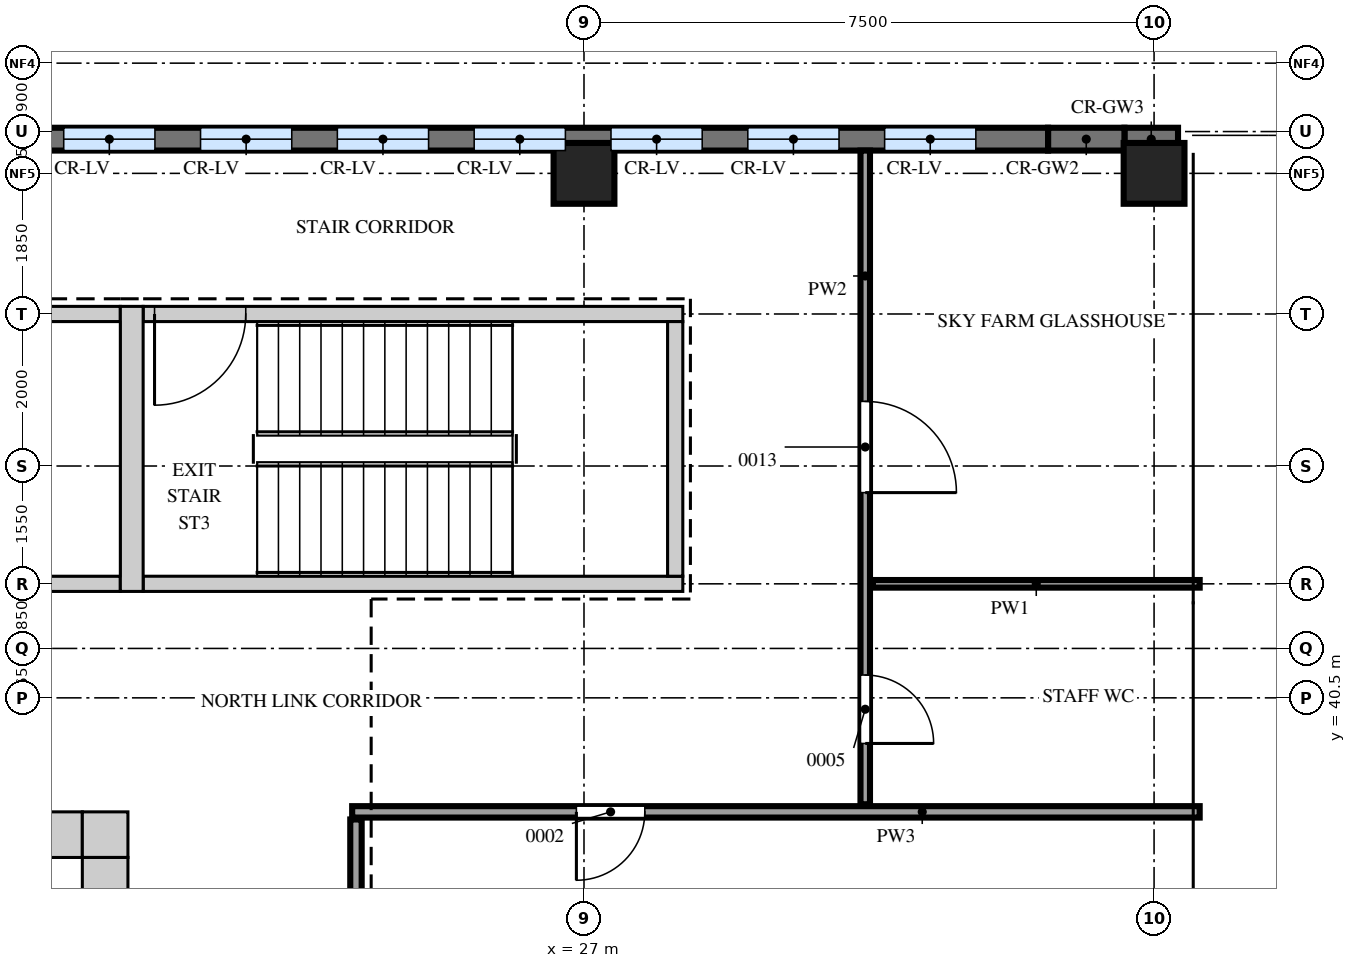
"""IFC4 building model, lengths in metres.
Left out: names, types, materials, properties, quantities, classifications, styles, units other than length and angle.
Written with IfcOpenShell. Run it as: python <this file> out.ifc"""

import sys

from ifc_helpers import new_model, si_unit, direction, frame, frame_2d, origin, origin_2d, place, context, subcontext, project, spatial, rectangle, extrude, source, transform, mapped, element, fill, save


model = new_model("IFC4")
c1 = context("Model", 3, precision=1e-05, world=origin(), true_north=direction((0.0, 1.0)))
c2 = subcontext(c1, "Body", "Model", "MODEL_VIEW")
j1 = project(units=[si_unit("LENGTHUNIT", "METRE"), si_unit("PLANEANGLEUNIT", "RADIAN")], contexts=[c1])
p1 = place(None, origin())
s1 = spatial("IfcSite", under=j1, at=p1, CompositionType="ELEMENT")
p2 = place(p1, origin())
s2 = spatial("IfcBuilding", under=s1, at=p2, CompositionType="ELEMENT")
p3 = place(p2, frame((0.0, 0.0, 334.7)))
s3 = spatial("IfcBuildingStorey", under=s2, at=p3, CompositionType="ELEMENT", Elevation=334.7)
m1 = source(origin(), c2, "Body", "SweptSolid", [
    extrude(rectangle(XDim=14.4, YDim=0.6, at=frame_2d((7.2, 0.0))), origin(), (0.0, 0.0, 1.0), 4.25),
])
p4 = place(p3, frame((6.0, 38.7, 0.0), z_axis=(0.0, 0.0, 1.0), x_axis=(1.0, 0.0, 0.0)))
e1 = element("IfcWall", 1, at=p4, inside=s3, PredefinedType="SHEAR", context=c2, shape_type="MappedRepresentation", body=[
    mapped(m1, transform((0.0, 0.0, 0.0))),
])
m2 = source(origin(), c2, "Body", "SweptSolid", [
    extrude(rectangle(XDim=0.9, YDim=2.1, at=frame_2d((0.45, 1.05))), frame((0.0, 0.31, 0.0), z_axis=(0.0, -1.0, 0.0), x_axis=(1.0, 0.0, 0.0)), (0.0, 0.0, 1.0), 0.62),
])
p5 = place(p4, frame((3.7, 0.0, 0.0)))
e2 = element("IfcOpeningElement", 2, at=p5, cuts=e1, PredefinedType="OPENING", context=c2, shape_type="MappedRepresentation", body=[
    mapped(m2, transform((0.0, 0.0, 0.0))),
])
p6 = place(p4, frame((10.4, 0.0, 0.0)))
e3 = element("IfcOpeningElement", 3, at=p6, cuts=e1, PredefinedType="OPENING", context=c2, shape_type="MappedRepresentation", body=[
    mapped(m2, transform((0.0, 0.0, 0.0))),
])
m3 = source(origin(), c2, "Body", "SweptSolid", [
    extrude(rectangle(XDim=0.6, YDim=0.6, at=frame_2d((0.3, 0.0))), origin(), (0.0, 0.0, 1.0), 4.25),
])
p7 = place(p3, frame((20.4, 38.7, 0.0), z_axis=(0.0, 0.0, 1.0), x_axis=(1.0, 0.0, 0.0)))
e4 = element("IfcWall", 4, at=p7, inside=s3, PredefinedType="SHEAR", context=c2, shape_type="MappedRepresentation", body=[
    mapped(m3, transform((0.0, 0.0, 0.0))),
])
m4 = source(origin(), c2, "Body", "SweptSolid", [
    extrude(rectangle(XDim=22.8, YDim=0.6, at=frame_2d((11.4, 0.0))), origin(), (0.0, 0.0, 1.0), 4.25),
])
p8 = place(p3, frame((20.7, 15.6, 0.0), z_axis=(0.0, 0.0, 1.0), x_axis=(0.0, 1.0, 0.0)))
e5 = element("IfcWall", 5, at=p8, inside=s3, PredefinedType="SHEAR", context=c2, shape_type="MappedRepresentation", body=[
    mapped(m4, transform((0.0, 0.0, 0.0))),
])
p9 = place(p8, frame((8.2, 0.0, 0.0)))
e6 = element("IfcOpeningElement", 6, at=p9, cuts=e5, PredefinedType="OPENING", context=c2, shape_type="MappedRepresentation", body=[
    mapped(m2, transform((0.0, 0.0, 0.0))),
])
p10 = place(p8, frame((11.35, 0.0, 0.0)))
e7 = element("IfcOpeningElement", 7, at=p10, cuts=e5, PredefinedType="OPENING", context=c2, shape_type="MappedRepresentation", body=[
    mapped(m2, transform((0.0, 0.0, 0.0))),
])
p11 = place(p8, frame((14.65, 0.0, 0.0)))
e8 = element("IfcOpeningElement", 8, at=p11, cuts=e5, PredefinedType="OPENING", context=c2, shape_type="MappedRepresentation", body=[
    mapped(m2, transform((0.0, 0.0, 0.0))),
])
p12 = place(p8, frame((1.55, 0.0, 0.0)))
e9 = element("IfcOpeningElement", 9, at=p12, cuts=e5, PredefinedType="OPENING", context=c2, shape_type="MappedRepresentation", body=[
    mapped(m2, transform((0.0, 0.0, 0.0))),
])
p13 = place(p8, frame((5.1, 0.0, 0.0)))
e10 = element("IfcOpeningElement", 10, at=p13, cuts=e5, PredefinedType="OPENING", context=c2, shape_type="MappedRepresentation", body=[
    mapped(m2, transform((0.0, 0.0, 0.0))),
])
m5 = source(origin(), c2, "Body", "SweptSolid", [
    extrude(rectangle(XDim=7.0, YDim=0.2, at=frame_2d((3.5, 0.0))), origin(), (0.0, 0.0, 1.0), 4.25),
])
p14 = place(p3, frame((13.9, 45.55, 0.0), z_axis=(0.0, 0.0, 1.0), x_axis=(1.0, 0.0, 0.0)))
e11 = element("IfcWall", 11, at=p14, inside=s3, PredefinedType="SHEAR", context=c2, shape_type="MappedRepresentation", body=[
    mapped(m5, transform((0.0, 0.0, 0.0))),
])
m6 = source(origin(), c2, "Body", "SweptSolid", [
    extrude(rectangle(XDim=1.2, YDim=2.1, at=frame_2d((0.6, 1.05))), frame((0.0, 0.11, 0.0), z_axis=(0.0, -1.0, 0.0), x_axis=(1.0, 0.0, 0.0)), (0.0, 0.0, 1.0), 0.22),
])
p15 = place(p14, frame((0.35, 0.0, 0.0)))
e12 = element("IfcOpeningElement", 12, at=p15, cuts=e11, PredefinedType="OPENING", context=c2, shape_type="MappedRepresentation", body=[
    mapped(m6, transform((0.0, 0.0, 0.0))),
])
p16 = place(p3, frame((13.9, 42.0, 0.0), z_axis=(0.0, 0.0, 1.0), x_axis=(1.0, 0.0, 0.0)))
e13 = element("IfcWall", 13, at=p16, inside=s3, PredefinedType="SHEAR", context=c2, shape_type="MappedRepresentation", body=[
    mapped(m5, transform((0.0, 0.0, 0.0))),
])
m7 = source(origin(), c2, "Body", "SweptSolid", [
    extrude(rectangle(XDim=7.1, YDim=0.2, at=frame_2d((3.55, 0.0))), origin(), (0.0, 0.0, 1.0), 4.25),
])
p17 = place(p3, frame((21.2, 45.55, 0.0), z_axis=(0.0, 0.0, 1.0), x_axis=(1.0, 0.0, 0.0)))
e14 = element("IfcWall", 14, at=p17, inside=s3, PredefinedType="SHEAR", context=c2, shape_type="MappedRepresentation", body=[
    mapped(m7, transform((0.0, 0.0, 0.0))),
])
p18 = place(p17, frame((0.15, 0.0, 0.0)))
e15 = element("IfcOpeningElement", 15, at=p18, cuts=e14, PredefinedType="OPENING", context=c2, shape_type="MappedRepresentation", body=[
    mapped(m6, transform((0.0, 0.0, 0.0))),
])
p19 = place(p3, frame((21.2, 42.0, 0.0), z_axis=(0.0, 0.0, 1.0), x_axis=(1.0, 0.0, 0.0)))
e16 = element("IfcWall", 16, at=p19, inside=s3, PredefinedType="SHEAR", context=c2, shape_type="MappedRepresentation", body=[
    mapped(m7, transform((0.0, 0.0, 0.0))),
])
m8 = source(origin(), c2, "Body", "SweptSolid", [
    extrude(rectangle(XDim=3.75, YDim=0.3, at=frame_2d((1.875, 0.0))), origin(), (0.0, 0.0, 1.0), 4.25),
])
p20 = place(p3, frame((21.05, 41.9, 0.0), z_axis=(0.0, 0.0, 1.0), x_axis=(0.0, 1.0, 0.0)))
e17 = element("IfcWall", 17, at=p20, inside=s3, PredefinedType="SHEAR", context=c2, shape_type="MappedRepresentation", body=[
    mapped(m8, transform((0.0, 0.0, 0.0))),
])
m9 = source(origin(), c2, "Body", "SweptSolid", [
    extrude(rectangle(XDim=3.35, YDim=0.2, at=frame_2d((1.675, 0.0))), origin(), (0.0, 0.0, 1.0), 4.25),
])
p21 = place(p3, frame((28.2, 42.1, 0.0), z_axis=(0.0, 0.0, 1.0), x_axis=(0.0, 1.0, 0.0)))
e18 = element("IfcWall", 18, at=p21, inside=s3, PredefinedType="SHEAR", context=c2, shape_type="MappedRepresentation", body=[
    mapped(m9, transform((0.0, 0.0, 0.0))),
])
m10 = source(origin(), c2, "Body", "SweptSolid", [
    extrude(rectangle(XDim=0.8, YDim=0.8, at=origin_2d()), origin(), (0.0, 0.0, 1.0), 4.5),
])
p22 = place(p3, frame((27.0, 47.4, 0.0), z_axis=(0.0, 0.0, 1.0), x_axis=(1.0, 0.0, 0.0)))
e19 = element("IfcColumn", 19, at=p22, inside=s3, PredefinedType="COLUMN", context=c2, shape_type="MappedRepresentation", body=[
    mapped(m10, transform((0.0, 0.0, 0.0))),
])
m11 = source(origin(), c2, "Body", "SweptSolid", [
    extrude(rectangle(XDim=0.8, YDim=0.8, at=origin_2d()), origin(), (0.0, 0.0, 1.0), 1.739),
])
p23 = place(p3, frame((34.5, 47.4, 0.0), z_axis=(0.0, 0.0, 1.0), x_axis=(1.0, 0.0, 0.0)))
e20 = element("IfcColumn", 20, at=p23, inside=s3, PredefinedType="COLUMN", context=c2, shape_type="MappedRepresentation", body=[
    mapped(m11, transform((0.0, 0.0, 0.0))),
])
m12 = source(origin(), c2, "Body", "SweptSolid", [
    extrude(rectangle(XDim=0.705, YDim=0.3, at=frame_2d((0.353, 0.0))), origin(), (0.0, 0.0, 1.0), 2.3),
])
p24 = place(p3, frame((34.815, 47.85, 0.0), z_axis=(0.0, 0.0, 1.0), x_axis=(-1.0, 0.0, 0.0)))
e21 = element("IfcWall", 21, at=p24, inside=s3, PredefinedType="SOLIDWALL", context=c2, shape_type="MappedRepresentation", body=[
    mapped(m12, transform((0.0, 0.0, 0.0))),
])
m13 = source(origin(), c2, "Body", "SweptSolid", [
    extrude(rectangle(XDim=1.005, YDim=0.3, at=frame_2d((0.502, 0.0))), origin(), (0.0, 0.0, 1.0), 4.05),
])
p25 = place(p3, frame((34.11, 47.85, 0.0), z_axis=(0.0, 0.0, 1.0), x_axis=(-1.0, 0.0, 0.0)))
e22 = element("IfcWall", 22, at=p25, inside=s3, PredefinedType="SOLIDWALL", context=c2, shape_type="MappedRepresentation", body=[
    mapped(m13, transform((0.0, 0.0, 0.0))),
])
m14 = source(origin(), c2, "Body", "SweptSolid", [
    extrude(rectangle(XDim=21.105, YDim=0.3, at=frame_2d((10.553, 0.0))), origin(), (0.0, 0.0, 1.0), 4.5),
])
p26 = place(p3, frame((33.105, 47.85, 0.0), z_axis=(0.0, 0.0, 1.0), x_axis=(-1.0, 0.0, 0.0)))
e23 = element("IfcWall", 23, at=p26, inside=s3, PredefinedType="SOLIDWALL", context=c2, shape_type="MappedRepresentation", body=[
    mapped(m14, transform((0.0, 0.0, 0.0))),
])
m15 = source(origin(), c2, "Body", "SweptSolid", [
    extrude(rectangle(XDim=1.2, YDim=2.4, at=frame_2d((0.6, 1.2))), frame((0.0, 0.16, 0.0), z_axis=(0.0, -1.0, 0.0), x_axis=(1.0, 0.0, 0.0)), (0.0, 0.0, 1.0), 0.32),
])
p27 = place(p26, frame((0.95, 0.0, 0.9)))
e24 = element("IfcOpeningElement", 24, at=p27, cuts=e23, PredefinedType="OPENING", context=c2, shape_type="MappedRepresentation", body=[
    mapped(m15, transform((0.0, 0.0, 0.0))),
])
p28 = place(p26, frame((2.75, 0.0, 0.9)))
e25 = element("IfcOpeningElement", 25, at=p28, cuts=e23, PredefinedType="OPENING", context=c2, shape_type="MappedRepresentation", body=[
    mapped(m15, transform((0.0, 0.0, 0.0))),
])
p29 = place(p26, frame((4.55, 0.0, 0.9)))
e26 = element("IfcOpeningElement", 26, at=p29, cuts=e23, PredefinedType="OPENING", context=c2, shape_type="MappedRepresentation", body=[
    mapped(m15, transform((0.0, 0.0, 0.0))),
])
p30 = place(p26, frame((6.35, 0.0, 0.9)))
e27 = element("IfcOpeningElement", 27, at=p30, cuts=e23, PredefinedType="OPENING", context=c2, shape_type="MappedRepresentation", body=[
    mapped(m15, transform((0.0, 0.0, 0.0))),
])
p31 = place(p26, frame((8.15, 0.0, 0.9)))
e28 = element("IfcOpeningElement", 28, at=p31, cuts=e23, PredefinedType="OPENING", context=c2, shape_type="MappedRepresentation", body=[
    mapped(m15, transform((0.0, 0.0, 0.0))),
])
p32 = place(p26, frame((9.95, 0.0, 0.9)))
e29 = element("IfcOpeningElement", 29, at=p32, cuts=e23, PredefinedType="OPENING", context=c2, shape_type="MappedRepresentation", body=[
    mapped(m15, transform((0.0, 0.0, 0.0))),
])
p33 = place(p26, frame((11.75, 0.0, 0.9)))
e30 = element("IfcOpeningElement", 30, at=p33, cuts=e23, PredefinedType="OPENING", context=c2, shape_type="MappedRepresentation", body=[
    mapped(m15, transform((0.0, 0.0, 0.0))),
])
p34 = place(p26, frame((13.55, 0.0, 0.9)))
e31 = element("IfcOpeningElement", 31, at=p34, cuts=e23, PredefinedType="OPENING", context=c2, shape_type="MappedRepresentation", body=[
    mapped(m15, transform((0.0, 0.0, 0.0))),
])
p35 = place(p26, frame((15.35, 0.0, 0.9)))
e32 = element("IfcOpeningElement", 32, at=p35, cuts=e23, PredefinedType="OPENING", context=c2, shape_type="MappedRepresentation", body=[
    mapped(m15, transform((0.0, 0.0, 0.0))),
])
p36 = place(p26, frame((17.15, 0.0, 0.9)))
e33 = element("IfcOpeningElement", 33, at=p36, cuts=e23, PredefinedType="OPENING", context=c2, shape_type="MappedRepresentation", body=[
    mapped(m15, transform((0.0, 0.0, 0.0))),
])
p37 = place(p26, frame((18.95, 0.0, 0.9)))
e34 = element("IfcOpeningElement", 34, at=p37, cuts=e23, PredefinedType="OPENING", context=c2, shape_type="MappedRepresentation", body=[
    mapped(m15, transform((0.0, 0.0, 0.0))),
])
m16 = source(origin(), c2, "Body", "SweptSolid", [
    extrude(rectangle(XDim=32.6, YDim=0.15, at=frame_2d((16.3, 0.0))), origin(), (0.0, 0.0, 1.0), 4.3),
])
p38 = place(p3, frame((24.0, 6.3, 0.0), z_axis=(0.0, 0.0, 1.0), x_axis=(0.0, 1.0, 0.0)))
e35 = element("IfcWall", 35, at=p38, inside=s3, PredefinedType="PARTITIONING", context=c2, shape_type="MappedRepresentation", body=[
    mapped(m16, transform((0.0, 0.0, 0.0))),
])
m17 = source(origin(), c2, "Body", "SweptSolid", [
    extrude(rectangle(XDim=0.9, YDim=2.1, at=frame_2d((0.45, 1.05))), frame((0.0, 0.085, 0.0), z_axis=(0.0, -1.0, 0.0), x_axis=(1.0, 0.0, 0.0)), (0.0, 0.0, 1.0), 0.17),
])
p39 = place(p38, frame((3.1, 0.0, 0.0)))
e36 = element("IfcOpeningElement", 36, at=p39, cuts=e35, PredefinedType="OPENING", context=c2, shape_type="MappedRepresentation", body=[
    mapped(m17, transform((0.0, 0.0, 0.0))),
])
p40 = place(p38, frame((12.6, 0.0, 0.0)))
e37 = element("IfcOpeningElement", 37, at=p40, cuts=e35, PredefinedType="OPENING", context=c2, shape_type="MappedRepresentation", body=[
    mapped(m17, transform((0.0, 0.0, 0.0))),
])
p41 = place(p38, frame((21.9, 0.0, 0.0)))
e38 = element("IfcOpeningElement", 38, at=p41, cuts=e35, PredefinedType="OPENING", context=c2, shape_type="MappedRepresentation", body=[
    mapped(m17, transform((0.0, 0.0, 0.0))),
])
m18 = source(origin(), c2, "Body", "SweptSolid", [
    extrude(rectangle(XDim=11.15, YDim=0.15, at=frame_2d((5.575, 0.0))), origin(), (0.0, 0.0, 1.0), 4.3),
])
p42 = place(p3, frame((23.95, 39.0, 0.0), z_axis=(0.0, 0.0, 1.0), x_axis=(1.0, 0.0, 0.0)))
e39 = element("IfcWall", 39, at=p42, inside=s3, PredefinedType="PARTITIONING", context=c2, shape_type="MappedRepresentation", body=[
    mapped(m18, transform((0.0, 0.0, 0.0))),
])
p43 = place(p42, frame((2.95, 0.0, 0.0)))
e40 = element("IfcOpeningElement", 40, at=p43, cuts=e39, PredefinedType="OPENING", context=c2, shape_type="MappedRepresentation", body=[
    mapped(m17, transform((0.0, 0.0, 0.0))),
])
m19 = source(origin(), c2, "Body", "SweptSolid", [
    extrude(rectangle(XDim=8.6, YDim=0.125, at=frame_2d((4.3, 0.0))), origin(), (0.0, 0.0, 1.0), 4.3),
])
p44 = place(p3, frame((30.7, 39.1, 0.0), z_axis=(0.0, 0.0, 1.0), x_axis=(0.0, 1.0, 0.0)))
e41 = element("IfcWall", 41, at=p44, inside=s3, PredefinedType="PARTITIONING", context=c2, shape_type="MappedRepresentation", body=[
    mapped(m19, transform((0.0, 0.0, 0.0))),
])
m20 = source(origin(), c2, "Body", "SweptSolid", [
    extrude(rectangle(XDim=0.9, YDim=2.1, at=frame_2d((0.45, 1.05))), frame((0.0, 0.073, 0.0), z_axis=(0.0, -1.0, 0.0), x_axis=(1.0, 0.0, 0.0)), (0.0, 0.0, 1.0), 0.145),
])
p45 = place(p44, frame((0.8, 0.0, 0.0)))
e42 = element("IfcOpeningElement", 42, at=p45, cuts=e41, PredefinedType="OPENING", context=c2, shape_type="MappedRepresentation", body=[
    mapped(m20, transform((0.0, 0.0, 0.0))),
])
m21 = source(origin(), c2, "Body", "SweptSolid", [
    extrude(rectangle(XDim=1.2, YDim=2.1, at=frame_2d((0.6, 1.05))), frame((0.0, 0.073, 0.0), z_axis=(0.0, -1.0, 0.0), x_axis=(1.0, 0.0, 0.0)), (0.0, 0.0, 1.0), 0.145),
])
p46 = place(p44, frame((4.1, 0.0, 0.0)))
e43 = element("IfcOpeningElement", 43, at=p46, cuts=e41, PredefinedType="OPENING", context=c2, shape_type="MappedRepresentation", body=[
    mapped(m21, transform((0.0, 0.0, 0.0))),
])
m22 = source(origin(), c2, "Body", "SweptSolid", [
    extrude(rectangle(XDim=4.3, YDim=0.1, at=frame_2d((2.15, 0.0))), origin(), (0.0, 0.0, 1.0), 4.3),
])
p47 = place(p3, frame((30.8, 42.0, 0.0), z_axis=(0.0, 0.0, 1.0), x_axis=(1.0, 0.0, 0.0)))
e44 = element("IfcWall", 44, at=p47, inside=s3, PredefinedType="PARTITIONING", context=c2, shape_type="MappedRepresentation", body=[
    mapped(m22, transform((0.0, 0.0, 0.0))),
])
m23 = source(origin(), c2, "Body", "SweptSolid", [
    extrude(rectangle(XDim=1.2, YDim=2.4, at=frame_2d((0.6, 1.2))), frame((0.0, 0.03, 0.0), z_axis=(0.0, -1.0, 0.0), x_axis=(1.0, 0.0, 0.0)), (0.0, 0.0, 1.0), 0.06),
])
p48 = place(p27, origin())
e45 = element("IfcWindow", 45, at=p48, inside=s3, PartitioningType="SINGLE_PANEL", PredefinedType="WINDOW", context=c2, shape_type="MappedRepresentation", body=[
    mapped(m23, transform((0.0, 0.0, 0.0))),
])
fill(e24, e45)
p49 = place(p28, origin())
e46 = element("IfcWindow", 46, at=p49, inside=s3, PartitioningType="SINGLE_PANEL", PredefinedType="WINDOW", context=c2, shape_type="MappedRepresentation", body=[
    mapped(m23, transform((0.0, 0.0, 0.0))),
])
fill(e25, e46)
p50 = place(p29, origin())
e47 = element("IfcWindow", 47, at=p50, inside=s3, PartitioningType="SINGLE_PANEL", PredefinedType="WINDOW", context=c2, shape_type="MappedRepresentation", body=[
    mapped(m23, transform((0.0, 0.0, 0.0))),
])
fill(e26, e47)
p51 = place(p30, origin())
e48 = element("IfcWindow", 48, at=p51, inside=s3, PartitioningType="SINGLE_PANEL", PredefinedType="WINDOW", context=c2, shape_type="MappedRepresentation", body=[
    mapped(m23, transform((0.0, 0.0, 0.0))),
])
fill(e27, e48)
p52 = place(p31, origin())
e49 = element("IfcWindow", 49, at=p52, inside=s3, PartitioningType="SINGLE_PANEL", PredefinedType="WINDOW", context=c2, shape_type="MappedRepresentation", body=[
    mapped(m23, transform((0.0, 0.0, 0.0))),
])
fill(e28, e49)
p53 = place(p32, origin())
e50 = element("IfcWindow", 50, at=p53, inside=s3, PartitioningType="SINGLE_PANEL", PredefinedType="WINDOW", context=c2, shape_type="MappedRepresentation", body=[
    mapped(m23, transform((0.0, 0.0, 0.0))),
])
fill(e29, e50)
p54 = place(p33, origin())
e51 = element("IfcWindow", 51, at=p54, inside=s3, PartitioningType="SINGLE_PANEL", PredefinedType="WINDOW", context=c2, shape_type="MappedRepresentation", body=[
    mapped(m23, transform((0.0, 0.0, 0.0))),
])
fill(e30, e51)
m24 = source(origin(), c2, "Body", "SweptSolid", [
    extrude(rectangle(XDim=0.9, YDim=2.1, at=frame_2d((0.45, 1.05))), frame((0.0, 0.025, 0.0), z_axis=(0.0, -1.0, 0.0), x_axis=(1.0, 0.0, 0.0)), (0.0, 0.0, 1.0), 0.05),
])
p55 = place(p43, origin())
e52 = element("IfcDoor", 52, at=p55, inside=s3, OperationType="SINGLE_SWING_LEFT", PredefinedType="DOOR", context=c2, shape_type="MappedRepresentation", body=[
    mapped(m24, transform((0.0, 0.0, 0.0))),
])
fill(e40, e52)
p56 = place(p45, origin())
e53 = element("IfcDoor", 53, at=p56, inside=s3, OperationType="SINGLE_SWING_LEFT", PredefinedType="DOOR", context=c2, shape_type="MappedRepresentation", body=[
    mapped(m24, transform((0.0, 0.0, 0.0))),
])
fill(e42, e53)
m25 = source(origin(), c2, "Body", "SweptSolid", [
    extrude(rectangle(XDim=1.2, YDim=2.1, at=frame_2d((0.6, 1.05))), frame((0.0, 0.025, 0.0), z_axis=(0.0, -1.0, 0.0), x_axis=(1.0, 0.0, 0.0)), (0.0, 0.0, 1.0), 0.05),
])
p57 = place(p46, origin())
e54 = element("IfcDoor", 54, at=p57, inside=s3, OperationType="SINGLE_SWING_LEFT", PredefinedType="DOOR", context=c2, shape_type="MappedRepresentation", body=[
    mapped(m25, transform((0.0, 0.0, 0.0))),
])
fill(e43, e54)
p58 = place(p18, origin())
e55 = element("IfcDoor", 55, at=p58, inside=s3, OperationType="SINGLE_SWING_LEFT", PredefinedType="DOOR", context=c2, shape_type="MappedRepresentation", body=[
    mapped(m25, transform((0.0, 0.0, 0.0))),
])
fill(e15, e55)
save(model, sys.argv[1])
